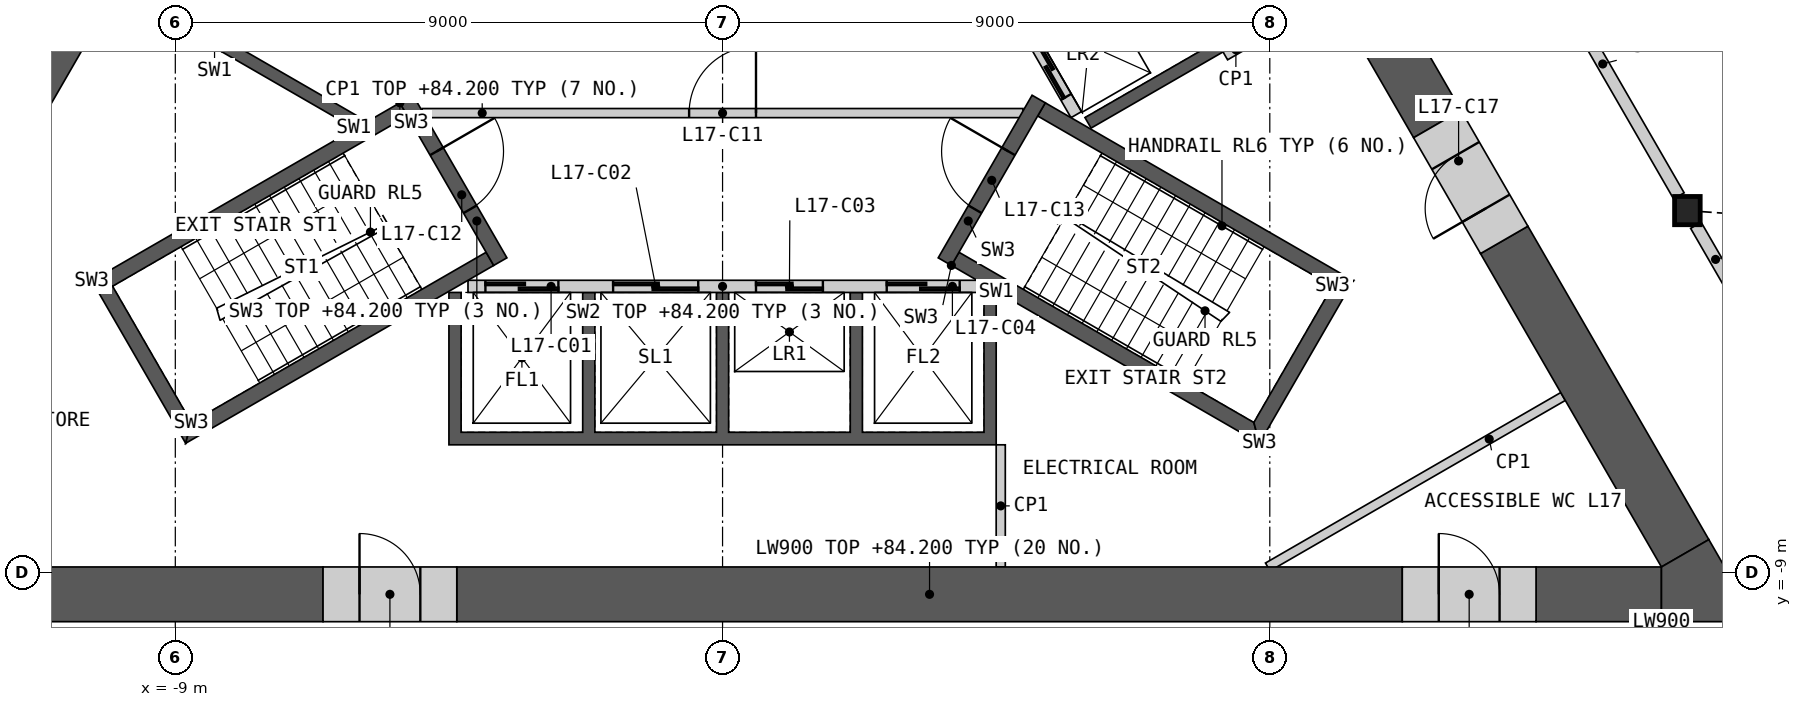
"""IFC4 building model, lengths in metres.
Left out: names, types, materials, properties, quantities, classifications, styles, units other than length and angle.
Written with IfcOpenShell. Run it as: python <this file> out.ifc"""

import sys

from ifc_helpers import new_model, si_unit, direction, frame, frame_2d, origin, origin_2d, place, context, subcontext, project, spatial, polyline, rectangle, i_section, outline, extrude, element, fill, save


model = new_model("IFC4")
c1 = context("Model", 3, precision=1e-05, world=origin(), true_north=direction((0.0, 1.0)))
c2 = subcontext(c1, "Body", "Model", "MODEL_VIEW")
j1 = project(units=[si_unit("LENGTHUNIT", "METRE"), si_unit("PLANEANGLEUNIT", "RADIAN")], contexts=[c1])
p1 = place(None, origin())
s1 = spatial("IfcSite", under=j1, at=p1, CompositionType="ELEMENT")
p2 = place(p1, origin())
s2 = spatial("IfcBuilding", under=s1, at=p2, CompositionType="ELEMENT")
p3 = place(p2, frame((0.0, 0.0, 80.4)))
s3 = spatial("IfcBuildingStorey", under=s2, at=p3, CompositionType="ELEMENT", Elevation=80.4)
p4 = place(p3, frame((15.868, -3.054, 0.0), z_axis=(0.0, 0.0, 1.0), x_axis=(1.0, 0.0, 0.0)))
e1 = element("IfcColumn", 1, at=p4, inside=s3, PredefinedType="COLUMN", context=c2, shape_type="SweptSolid", body=[
    extrude(i_section(OverallWidth=0.421, OverallDepth=0.465, WebThickness=0.045, FlangeThickness=0.072, at=origin_2d()), origin(), (0.0, 0.0, 1.0), 4.2),
])
p5 = place(p3, origin())
e2 = element("IfcWall", 2, at=p5, inside=s3, PredefinedType="SHEAR", context=c2, shape_type="SweptSolid", body=[
    extrude(outline(polyline([(4.5, -4.4), (4.5, -6.906), (-4.5, -6.906), (-4.5, -4.4), (-4.3, -4.4), (-4.3, -6.7), (-2.3, -6.7), (-2.3, -4.4), (-2.1, -4.4), (-2.1, -6.7), (-0.1, -6.7), (-0.1, -4.4), (0.1, -4.4), (0.1, -6.7), (2.1, -6.7), (2.1, -4.4), (2.3, -4.4), (2.3, -6.7), (4.3, -6.7), (4.3, -4.4), (4.5, -4.4)])), origin(), (0.0, 0.0, 1.0), 3.8),
])
p6 = place(p3, frame((-4.187, -4.3, 0.0), z_axis=(0.0, 0.0, 1.0), x_axis=(1.0, 0.0, 0.0)))
e3 = element("IfcWall", 3, at=p6, inside=s3, PredefinedType="SOLIDWALL", context=c2, shape_type="SweptSolid", body=[
    extrude(rectangle(XDim=8.373, YDim=0.2, at=frame_2d((4.187, 0.0))), origin(), (0.0, 0.0, 1.0), 3.8),
])
p7 = place(p6, frame((0.287, 0.0, 0.0)))
e4 = element("IfcOpeningElement", 4, at=p7, cuts=e3, PredefinedType="OPENING", context=c2, shape_type="SweptSolid", body=[
    extrude(rectangle(XDim=1.2, YDim=2.1, at=frame_2d((0.6, 1.05))), frame((0.0, 0.11, 0.0), z_axis=(0.0, -1.0, 0.0), x_axis=(1.0, 0.0, 0.0)), (0.0, 0.0, 1.0), 0.22),
])
p8 = place(p6, frame((2.387, 0.0, 0.0)))
e5 = element("IfcOpeningElement", 5, at=p8, cuts=e3, PredefinedType="OPENING", context=c2, shape_type="SweptSolid", body=[
    extrude(rectangle(XDim=1.4, YDim=2.1, at=frame_2d((0.7, 1.05))), frame((0.0, 0.11, 0.0), z_axis=(0.0, -1.0, 0.0), x_axis=(1.0, 0.0, 0.0)), (0.0, 0.0, 1.0), 0.22),
])
p9 = place(p6, frame((4.737, 0.0, 0.0)))
e6 = element("IfcOpeningElement", 6, at=p9, cuts=e3, PredefinedType="OPENING", context=c2, shape_type="SweptSolid", body=[
    extrude(rectangle(XDim=1.1, YDim=2.1, at=frame_2d((0.55, 1.05))), frame((0.0, 0.11, 0.0), z_axis=(0.0, -1.0, 0.0), x_axis=(1.0, 0.0, 0.0)), (0.0, 0.0, 1.0), 0.22),
])
p10 = place(p6, frame((6.887, 0.0, 0.0)))
e7 = element("IfcOpeningElement", 7, at=p10, cuts=e3, PredefinedType="OPENING", context=c2, shape_type="SweptSolid", body=[
    extrude(rectangle(XDim=1.2, YDim=2.1, at=frame_2d((0.6, 1.05))), frame((0.0, 0.11, 0.0), z_axis=(0.0, -1.0, 0.0), x_axis=(1.0, 0.0, 0.0)), (0.0, 0.0, 1.0), 0.22),
])
p11 = place(p3, origin())
e8 = element("IfcWall", 8, at=p11, inside=s3, PredefinedType="SHEAR", context=c2, shape_type="SweptSolid", body=[
    extrude(outline(polyline([(2.66, 4.192), (4.831, 5.445), (8.231, -0.444), (6.061, -1.697), (5.96, -1.524), (7.952, -0.374), (6.952, 1.358), (4.96, 0.208), (4.861, 0.381), (6.852, 1.531), (5.852, 3.263), (3.861, 2.113), (3.76, 2.287), (5.752, 3.437), (4.752, 5.169), (2.76, 4.019), (2.66, 4.192)])), origin(), (0.0, 0.0, 1.0), 3.8),
])
p12 = place(p3, frame((5.817, -1.476, 0.0), z_axis=(0.0, 0.0, 1.0), x_axis=(-0.500002616675, 0.866023893041, 0.0)))
e9 = element("IfcWall", 9, at=p12, inside=s3, PredefinedType="SOLIDWALL", context=c2, shape_type="SweptSolid", body=[
    extrude(rectangle(XDim=8.373, YDim=0.2, at=frame_2d((4.187, 0.0))), origin(), (0.0, 0.0, 1.0), 3.8),
])
p13 = place(p12, frame((0.337, 0.0, 0.0)))
e10 = element("IfcOpeningElement", 10, at=p13, cuts=e9, PredefinedType="OPENING", context=c2, shape_type="SweptSolid", body=[
    extrude(rectangle(XDim=1.1, YDim=2.1, at=frame_2d((0.55, 1.05))), frame((0.0, 0.11, 0.0), z_axis=(0.0, -1.0, 0.0), x_axis=(1.0, 0.0, 0.0)), (0.0, 0.0, 1.0), 0.22),
])
p14 = place(p12, frame((2.537, 0.0, 0.0)))
e11 = element("IfcOpeningElement", 11, at=p14, cuts=e9, PredefinedType="OPENING", context=c2, shape_type="SweptSolid", body=[
    extrude(rectangle(XDim=1.1, YDim=2.1, at=frame_2d((0.55, 1.05))), frame((0.0, 0.11, 0.0), z_axis=(0.0, -1.0, 0.0), x_axis=(1.0, 0.0, 0.0)), (0.0, 0.0, 1.0), 0.22),
])
p15 = place(p12, frame((4.737, 0.0, 0.0)))
e12 = element("IfcOpeningElement", 12, at=p15, cuts=e9, PredefinedType="OPENING", context=c2, shape_type="SweptSolid", body=[
    extrude(rectangle(XDim=1.1, YDim=2.1, at=frame_2d((0.55, 1.05))), frame((0.0, 0.11, 0.0), z_axis=(0.0, -1.0, 0.0), x_axis=(1.0, 0.0, 0.0)), (0.0, 0.0, 1.0), 0.22),
])
p16 = place(p12, frame((7.037, 0.0, 0.0)))
e13 = element("IfcOpeningElement", 13, at=p16, cuts=e9, PredefinedType="OPENING", context=c2, shape_type="SweptSolid", body=[
    extrude(rectangle(XDim=0.9, YDim=2.1, at=frame_2d((0.45, 1.05))), frame((0.0, 0.11, 0.0), z_axis=(0.0, -1.0, 0.0), x_axis=(1.0, 0.0, 0.0)), (0.0, 0.0, 1.0), 0.22),
])
p17 = place(p3, origin())
e14 = element("IfcWall", 14, at=p17, inside=s3, PredefinedType="SHEAR", context=c2, shape_type="SweptSolid", body=[
    extrude(outline(polyline([(-6.061, -1.697), (-8.231, -0.444), (-8.131, -0.271), (-5.96, -1.524), (-6.061, -1.697)])), origin(), (0.0, 0.0, 1.0), 3.8),
])
p18 = place(p3, frame((-4.941, -1.45, 0.0), z_axis=(0.0, 0.0, 1.0), x_axis=(1.0, 0.0, 0.0)))
e15 = element("IfcWall", 15, at=p18, inside=s3, PredefinedType="PARTITIONING", context=c2, shape_type="SweptSolid", body=[
    extrude(rectangle(XDim=9.882, YDim=0.15, at=frame_2d((4.941, 0.0))), origin(), (0.0, 0.0, 1.0), 3.8),
])
p19 = place(p18, frame((4.391, 0.0, 0.0)))
e16 = element("IfcOpeningElement", 16, at=p19, cuts=e15, PredefinedType="OPENING", context=c2, shape_type="SweptSolid", body=[
    extrude(rectangle(XDim=1.1, YDim=2.1, at=frame_2d((0.55, 1.05))), frame((0.0, 0.085, 0.0), z_axis=(0.0, -1.0, 0.0), x_axis=(1.0, 0.0, 0.0)), (0.0, 0.0, 1.0), 0.17),
])
p20 = place(p3, origin())
e17 = element("IfcWall", 17, at=p20, inside=s3, PredefinedType="SHEAR", context=c2, shape_type="SweptSolid", body=[
    extrude(outline(polyline([(-5.307, -1.281), (-10.374, -4.206), (-10.032, -4.298), (-5.182, -1.498), (-5.307, -1.281)])), origin(), (0.0, 0.0, 1.0), 3.8),
])
p21 = place(p3, origin())
e18 = element("IfcWall", 18, at=p21, inside=s3, PredefinedType="SHEAR", context=c2, shape_type="SweptSolid", body=[
    extrude(outline(polyline([(-10.374, -4.206), (-8.83, -6.881), (-8.738, -6.539), (-10.032, -4.298), (-10.374, -4.206)])), origin(), (0.0, 0.0, 1.0), 3.8),
])
p22 = place(p3, origin())
e19 = element("IfcWall", 19, at=p22, inside=s3, PredefinedType="SHEAR", context=c2, shape_type="SweptSolid", body=[
    extrude(outline(polyline([(-8.738, -6.539), (-8.83, -6.881), (-3.763, -3.956), (-3.888, -3.739), (-8.738, -6.539)])), origin(), (0.0, 0.0, 1.0), 3.8),
])
p23 = place(p3, frame((-5.199, -1.219, 0.0), z_axis=(0.0, 0.0, 1.0), x_axis=(0.499982516597, -0.866035497597, 0.0)))
e20 = element("IfcWall", 20, at=p23, inside=s3, PredefinedType="SHEAR", context=c2, shape_type="SweptSolid", body=[
    extrude(rectangle(XDim=3.088, YDim=0.25, at=frame_2d((1.544, 0.0))), origin(), (0.0, 0.0, 1.0), 3.8),
])
p24 = place(p23, frame((0.994, 0.0, 0.0)))
e21 = element("IfcOpeningElement", 21, at=p24, cuts=e20, PredefinedType="OPENING", context=c2, shape_type="SweptSolid", body=[
    extrude(rectangle(XDim=1.1, YDim=2.1, at=frame_2d((0.55, 1.05))), frame((0.0, 0.135, 0.0), z_axis=(0.0, -1.0, 0.0), x_axis=(1.0, 0.0, 0.0)), (0.0, 0.0, 1.0), 0.27),
])
p25 = place(p3, origin())
e22 = element("IfcWall", 22, at=p25, inside=s3, PredefinedType="SHEAR", context=c2, shape_type="SweptSolid", body=[
    extrude(outline(polyline([(3.763, -3.956), (8.83, -6.881), (8.738, -6.539), (3.888, -3.739), (3.763, -3.956)])), origin(), (0.0, 0.0, 1.0), 3.8),
])
p26 = place(p3, origin())
e23 = element("IfcWall", 23, at=p26, inside=s3, PredefinedType="SHEAR", context=c2, shape_type="SweptSolid", body=[
    extrude(outline(polyline([(8.83, -6.881), (10.374, -4.206), (10.032, -4.298), (8.738, -6.539), (8.83, -6.881)])), origin(), (0.0, 0.0, 1.0), 3.8),
])
p27 = place(p3, origin())
e24 = element("IfcWall", 24, at=p27, inside=s3, PredefinedType="SHEAR", context=c2, shape_type="SweptSolid", body=[
    extrude(outline(polyline([(10.032, -4.298), (10.374, -4.206), (5.307, -1.281), (5.182, -1.498), (10.032, -4.298)])), origin(), (0.0, 0.0, 1.0), 3.8),
])
p28 = place(p3, frame((3.655, -3.893, 0.0), z_axis=(0.0, 0.0, 1.0), x_axis=(0.499982516597, 0.866035497597, 0.0)))
e25 = element("IfcWall", 25, at=p28, inside=s3, PredefinedType="SHEAR", context=c2, shape_type="SweptSolid", body=[
    extrude(rectangle(XDim=3.088, YDim=0.25, at=frame_2d((1.544, 0.0))), origin(), (0.0, 0.0, 1.0), 3.8),
])
p29 = place(p28, frame((0.994, 0.0, 0.0)))
e26 = element("IfcOpeningElement", 26, at=p29, cuts=e25, PredefinedType="OPENING", context=c2, shape_type="SweptSolid", body=[
    extrude(rectangle(XDim=1.1, YDim=2.1, at=frame_2d((0.55, 1.05))), frame((0.0, 0.135, 0.0), z_axis=(0.0, -1.0, 0.0), x_axis=(1.0, 0.0, 0.0)), (0.0, 0.0, 1.0), 0.27),
])
p30 = place(p3, frame((8.268, -0.509, 0.0), z_axis=(0.0, 0.0, 1.0), x_axis=(0.866035824272, 0.499981950752, 0.0)))
e27 = element("IfcWall", 27, at=p30, inside=s3, PredefinedType="PARTITIONING", context=c2, shape_type="SweptSolid", body=[
    extrude(rectangle(XDim=2.009, YDim=0.15, at=frame_2d((1.004, 0.0))), origin(), (0.0, 0.0, 1.0), 3.8),
])
p31 = place(p3, frame((4.575, -6.906, 0.0), z_axis=(0.0, 0.0, 1.0), x_axis=(0.0, -1.0, 0.0)))
e28 = element("IfcWall", 28, at=p31, inside=s3, PredefinedType="PARTITIONING", context=c2, shape_type="SweptSolid", body=[
    extrude(rectangle(XDim=2.009, YDim=0.15, at=frame_2d((1.004, 0.0))), origin(), (0.0, 0.0, 1.0), 3.8),
])
p32 = place(p3, frame((13.823, -6.111, 0.0), z_axis=(0.0, 0.0, 1.0), x_axis=(-0.866026802741, -0.499997576928, 0.0)))
e29 = element("IfcWall", 29, at=p32, inside=s3, PredefinedType="PARTITIONING", context=c2, shape_type="SweptSolid", body=[
    extrude(rectangle(XDim=5.607, YDim=0.15, at=frame_2d((2.804, 0.0))), origin(), (0.0, 0.0, 1.0), 3.8),
])
p33 = place(p3, frame((-4.371, -9.365, 0.0), z_axis=(0.0, 0.0, 1.0), x_axis=(1.0, 0.0, 0.0)))
e30 = element("IfcWall", 30, at=p33, inside=s3, PredefinedType="SHEAR", context=c2, shape_type="SweptSolid", body=[
    extrude(rectangle(XDim=15.55, YDim=0.9, at=frame_2d((7.775, 0.0))), origin(), (0.0, 0.0, 1.0), 3.8),
])
p34 = place(p3, frame((-15.441, -9.365, 0.0), z_axis=(0.0, 0.0, 1.0), x_axis=(1.0, 0.0, 0.0)))
e31 = element("IfcWall", 31, at=p34, inside=s3, PredefinedType="SHEAR", context=c2, shape_type="SweptSolid", body=[
    extrude(rectangle(XDim=8.871, YDim=0.9, at=frame_2d((4.435, 0.0))), origin(), (0.0, 0.0, 1.0), 3.8),
])
p35 = place(p3, frame((13.379, -9.365, 0.0), z_axis=(0.0, 0.0, 1.0), x_axis=(1.0, 0.0, 0.0)))
e32 = element("IfcWall", 32, at=p35, inside=s3, PredefinedType="SHEAR", context=c2, shape_type="SweptSolid", body=[
    extrude(rectangle(XDim=2.062, YDim=0.9, at=frame_2d((1.031, 0.0))), origin(), (0.0, 0.0, 1.0), 3.8),
])
p36 = place(p3, frame((15.831, -8.69, 0.0), z_axis=(0.0, 0.0, 1.0), x_axis=(-0.499999419053, 0.866025739194, 0.0)))
e33 = element("IfcWall", 33, at=p36, inside=s3, PredefinedType="SHEAR", context=c2, shape_type="SweptSolid", body=[
    extrude(rectangle(XDim=5.952, YDim=0.9, at=frame_2d((2.976, 0.0))), origin(), (0.0, 0.0, 1.0), 3.8),
])
p37 = place(p3, frame((11.755, -1.63, 0.0), z_axis=(0.0, 0.0, 1.0), x_axis=(-0.499943114462, 0.866058244174, 0.0)))
e34 = element("IfcWall", 34, at=p37, inside=s3, PredefinedType="SHEAR", context=c2, shape_type="SweptSolid", body=[
    extrude(rectangle(XDim=2.809, YDim=0.9, at=frame_2d((1.405, 0.0))), origin(), (0.0, 0.0, 1.0), 3.8),
])
p38 = place(p3, frame((-10.31, 0.872, 0.0), z_axis=(0.0, 0.0, 1.0), x_axis=(-0.499991697393, -0.866030197244, 0.0)))
e35 = element("IfcWall", 35, at=p38, inside=s3, PredefinedType="SHEAR", context=c2, shape_type="SweptSolid", body=[
    extrude(rectangle(XDim=11.041, YDim=0.9, at=frame_2d((5.521, 0.0))), origin(), (0.0, 0.0, 1.0), 3.8),
])
p39 = place(p3, origin())
e36 = element("IfcWall", 36, at=p39, inside=s3, PredefinedType="SHEAR", context=c2, shape_type="SweptSolid", body=[
    extrude(outline(polyline([(15.441, -9.815), (15.441, -8.915), (16.221, -8.465), (17.0, -9.815), (15.441, -9.815)])), origin(), (0.0, 0.0, 1.0), 3.8),
])
p40 = place(p3, frame((11.179, -9.365, 0.0), z_axis=(0.0, 0.0, 1.0), x_axis=(1.0, 0.0, 0.0)))
e37 = element("IfcWall", 37, at=p40, inside=s3, PredefinedType="SHEAR", context=c2, shape_type="SweptSolid", body=[
    extrude(rectangle(XDim=2.2, YDim=0.9, at=frame_2d((1.1, 0.0))), origin(), (0.0, 0.0, 1.0), 3.8),
])
p41 = place(p40, frame((0.6, 0.0, 0.0)))
e38 = element("IfcOpeningElement", 38, at=p41, cuts=e37, PredefinedType="OPENING", context=c2, shape_type="SweptSolid", body=[
    extrude(rectangle(XDim=1.0, YDim=2.1, at=frame_2d((0.5, 1.05))), frame((0.0, 0.46, 0.0), z_axis=(0.0, -1.0, 0.0), x_axis=(1.0, 0.0, 0.0)), (0.0, 0.0, 1.0), 0.92),
])
p42 = place(p3, frame((-6.571, -9.365, 0.0), z_axis=(0.0, 0.0, 1.0), x_axis=(1.0, 0.0, 0.0)))
e39 = element("IfcWall", 39, at=p42, inside=s3, PredefinedType="SHEAR", context=c2, shape_type="SweptSolid", body=[
    extrude(rectangle(XDim=2.2, YDim=0.9, at=frame_2d((1.1, 0.0))), origin(), (0.0, 0.0, 1.0), 3.8),
])
p43 = place(p42, frame((0.6, 0.0, 0.0)))
e40 = element("IfcOpeningElement", 40, at=p43, cuts=e39, PredefinedType="OPENING", context=c2, shape_type="SweptSolid", body=[
    extrude(rectangle(XDim=1.0, YDim=2.1, at=frame_2d((0.5, 1.05))), frame((0.0, 0.46, 0.0), z_axis=(0.0, -1.0, 0.0), x_axis=(1.0, 0.0, 0.0)), (0.0, 0.0, 1.0), 0.92),
])
p44 = place(p3, frame((12.855, -3.536, 0.0), z_axis=(0.0, 0.0, 1.0), x_axis=(-0.50002983664, 0.866008176907, 0.0)))
e41 = element("IfcWall", 41, at=p44, inside=s3, PredefinedType="SHEAR", context=c2, shape_type="SweptSolid", body=[
    extrude(rectangle(XDim=2.2, YDim=0.9, at=frame_2d((1.1, 0.0))), origin(), (0.0, 0.0, 1.0), 3.8),
])
p45 = place(p44, frame((0.6, 0.0, 0.0)))
e42 = element("IfcOpeningElement", 42, at=p45, cuts=e41, PredefinedType="OPENING", context=c2, shape_type="SweptSolid", body=[
    extrude(rectangle(XDim=1.0, YDim=2.1, at=frame_2d((0.5, 1.05))), frame((0.0, 0.46, 0.0), z_axis=(0.0, -1.0, 0.0), x_axis=(1.0, 0.0, 0.0)), (0.0, 0.0, 1.0), 0.92),
])
p46 = place(p3, frame((-15.728, -2.811, 0.0), z_axis=(0.0, 0.0, 1.0), x_axis=(0.49999175339, 0.866030164915, 0.0)))
e43 = element("IfcWall", 43, at=p46, inside=s3, PredefinedType="PARTITIONING", context=c2, shape_type="SweptSolid", body=[
    extrude(rectangle(XDim=10.019, YDim=0.2, at=frame_2d((5.009, 0.0))), origin(), (0.0, 0.0, 1.0), 3.8),
])
p47 = place(p46, frame((4.76, 0.0, 0.0)))
e44 = element("IfcOpeningElement", 44, at=p47, cuts=e43, PredefinedType="OPENING", context=c2, shape_type="SweptSolid", body=[
    extrude(rectangle(XDim=1.0, YDim=2.1, at=frame_2d((0.5, 1.05))), frame((0.0, 0.11, 0.0), z_axis=(0.0, -1.0, 0.0), x_axis=(1.0, 0.0, 0.0)), (0.0, 0.0, 1.0), 0.22),
])
p48 = place(p3, frame((10.719, 5.865, 0.0), z_axis=(0.0, 0.0, 1.0), x_axis=(0.49999175339, -0.866030164915, 0.0)))
e45 = element("IfcWall", 45, at=p48, inside=s3, PredefinedType="PARTITIONING", context=c2, shape_type="SweptSolid", body=[
    extrude(rectangle(XDim=10.019, YDim=0.2, at=frame_2d((5.009, 0.0))), origin(), (0.0, 0.0, 1.0), 3.8),
])
p49 = place(p48, frame((1.854, 0.0, 0.0)))
e46 = element("IfcOpeningElement", 46, at=p49, cuts=e45, PredefinedType="OPENING", context=c2, shape_type="SweptSolid", body=[
    extrude(rectangle(XDim=1.0, YDim=2.1, at=frame_2d((0.5, 1.05))), frame((0.0, 0.11, 0.0), z_axis=(0.0, -1.0, 0.0), x_axis=(1.0, 0.0, 0.0)), (0.0, 0.0, 1.0), 0.22),
])
p50 = place(p3, frame((16.008, -3.296, 0.0), z_axis=(0.0, 0.0, 1.0), x_axis=(0.499984737558, -0.86603421538, 0.0)))
e47 = element("IfcWall", 47, at=p50, inside=s3, PredefinedType="PARTITIONING", context=c2, shape_type="SweptSolid", body=[
    extrude(rectangle(XDim=6.473, YDim=0.2, at=frame_2d((3.236, 0.0))), origin(), (0.0, 0.0, 1.0), 3.8),
])
p51 = place(p50, frame((2.285, 0.0, 0.0)))
e48 = element("IfcOpeningElement", 48, at=p51, cuts=e47, PredefinedType="OPENING", context=c2, shape_type="SweptSolid", body=[
    extrude(rectangle(XDim=1.8, YDim=2.1, at=frame_2d((0.9, 1.05))), frame((0.0, 0.11, 0.0), z_axis=(0.0, -1.0, 0.0), x_axis=(1.0, 0.0, 0.0)), (0.0, 0.0, 1.0), 0.22),
])
p52 = place(p7, origin())
e49 = element("IfcDoor", 49, at=p52, inside=s3, OperationType="SLIDING_TO_LEFT", PredefinedType="DOOR", context=c2, shape_type="SweptSolid", body=[
    extrude(rectangle(XDim=1.2, YDim=2.1, at=frame_2d((0.6, 1.05))), frame((0.0, 0.025, 0.0), z_axis=(0.0, -1.0, 0.0), x_axis=(1.0, 0.0, 0.0)), (0.0, 0.0, 1.0), 0.05),
])
fill(e4, e49)
p53 = place(p8, origin())
e50 = element("IfcDoor", 50, at=p53, inside=s3, OperationType="SLIDING_TO_LEFT", PredefinedType="DOOR", context=c2, shape_type="SweptSolid", body=[
    extrude(rectangle(XDim=1.4, YDim=2.1, at=frame_2d((0.7, 1.05))), frame((0.0, 0.025, 0.0), z_axis=(0.0, -1.0, 0.0), x_axis=(1.0, 0.0, 0.0)), (0.0, 0.0, 1.0), 0.05),
])
fill(e5, e50)
p54 = place(p9, origin())
e51 = element("IfcDoor", 51, at=p54, inside=s3, OperationType="SLIDING_TO_LEFT", PredefinedType="DOOR", context=c2, shape_type="SweptSolid", body=[
    extrude(rectangle(XDim=1.1, YDim=2.1, at=frame_2d((0.55, 1.05))), frame((0.0, 0.025, 0.0), z_axis=(0.0, -1.0, 0.0), x_axis=(1.0, 0.0, 0.0)), (0.0, 0.0, 1.0), 0.05),
])
fill(e6, e51)
p55 = place(p10, origin())
e52 = element("IfcDoor", 52, at=p55, inside=s3, OperationType="SLIDING_TO_LEFT", PredefinedType="DOOR", context=c2, shape_type="SweptSolid", body=[
    extrude(rectangle(XDim=1.2, YDim=2.1, at=frame_2d((0.6, 1.05))), frame((0.0, 0.025, 0.0), z_axis=(0.0, -1.0, 0.0), x_axis=(1.0, 0.0, 0.0)), (0.0, 0.0, 1.0), 0.05),
])
fill(e7, e52)
p56 = place(p13, origin())
e53 = element("IfcDoor", 53, at=p56, inside=s3, OperationType="SLIDING_TO_LEFT", PredefinedType="DOOR", context=c2, shape_type="SweptSolid", body=[
    extrude(rectangle(XDim=1.1, YDim=2.1, at=frame_2d((0.55, 1.05))), frame((0.0, 0.025, 0.0), z_axis=(0.0, -1.0, 0.0), x_axis=(1.0, 0.0, 0.0)), (0.0, 0.0, 1.0), 0.05),
])
fill(e10, e53)
p57 = place(p19, origin())
e54 = element("IfcDoor", 54, at=p57, inside=s3, OperationType="SINGLE_SWING_RIGHT", PredefinedType="DOOR", context=c2, shape_type="SweptSolid", body=[
    extrude(rectangle(XDim=1.1, YDim=2.1, at=frame_2d((0.55, 1.05))), frame((0.0, 0.025, 0.0), z_axis=(0.0, -1.0, 0.0), x_axis=(1.0, 0.0, 0.0)), (0.0, 0.0, 1.0), 0.05),
])
fill(e16, e54)
p58 = place(p24, origin())
e55 = element("IfcDoor", 55, at=p58, inside=s3, OperationType="SINGLE_SWING_LEFT", PredefinedType="DOOR", context=c2, shape_type="SweptSolid", body=[
    extrude(rectangle(XDim=1.1, YDim=2.1, at=frame_2d((0.55, 1.05))), frame((0.0, 0.025, 0.0), z_axis=(0.0, -1.0, 0.0), x_axis=(1.0, 0.0, 0.0)), (0.0, 0.0, 1.0), 0.05),
])
fill(e21, e55)
p59 = place(p29, origin())
e56 = element("IfcDoor", 56, at=p59, inside=s3, OperationType="SINGLE_SWING_RIGHT", PredefinedType="DOOR", context=c2, shape_type="SweptSolid", body=[
    extrude(rectangle(XDim=1.1, YDim=2.1, at=frame_2d((0.55, 1.05))), frame((0.0, 0.025, 0.0), z_axis=(0.0, -1.0, 0.0), x_axis=(1.0, 0.0, 0.0)), (0.0, 0.0, 1.0), 0.05),
])
fill(e26, e56)
p60 = place(p41, origin())
e57 = element("IfcDoor", 57, at=p60, inside=s3, OperationType="SINGLE_SWING_LEFT", PredefinedType="DOOR", context=c2, shape_type="SweptSolid", body=[
    extrude(rectangle(XDim=1.0, YDim=2.1, at=frame_2d((0.5, 1.05))), frame((0.0, 0.205, 0.0), z_axis=(0.0, -1.0, 0.0), x_axis=(1.0, 0.0, 0.0)), (0.0, 0.0, 1.0), 0.05),
])
fill(e38, e57)
p61 = place(p43, origin())
e58 = element("IfcDoor", 58, at=p61, inside=s3, OperationType="SINGLE_SWING_LEFT", PredefinedType="DOOR", context=c2, shape_type="SweptSolid", body=[
    extrude(rectangle(XDim=1.0, YDim=2.1, at=frame_2d((0.5, 1.05))), frame((0.0, 0.205, 0.0), z_axis=(0.0, -1.0, 0.0), x_axis=(1.0, 0.0, 0.0)), (0.0, 0.0, 1.0), 0.05),
])
fill(e40, e58)
p62 = place(p45, origin())
e59 = element("IfcDoor", 59, at=p62, inside=s3, OperationType="SINGLE_SWING_LEFT", PredefinedType="DOOR", context=c2, shape_type="SweptSolid", body=[
    extrude(rectangle(XDim=1.0, YDim=2.1, at=frame_2d((0.5, 1.05))), frame((0.0, 0.205, 0.0), z_axis=(0.0, -1.0, 0.0), x_axis=(1.0, 0.0, 0.0)), (0.0, 0.0, 1.0), 0.05),
])
fill(e42, e59)
save(model, sys.argv[1])
